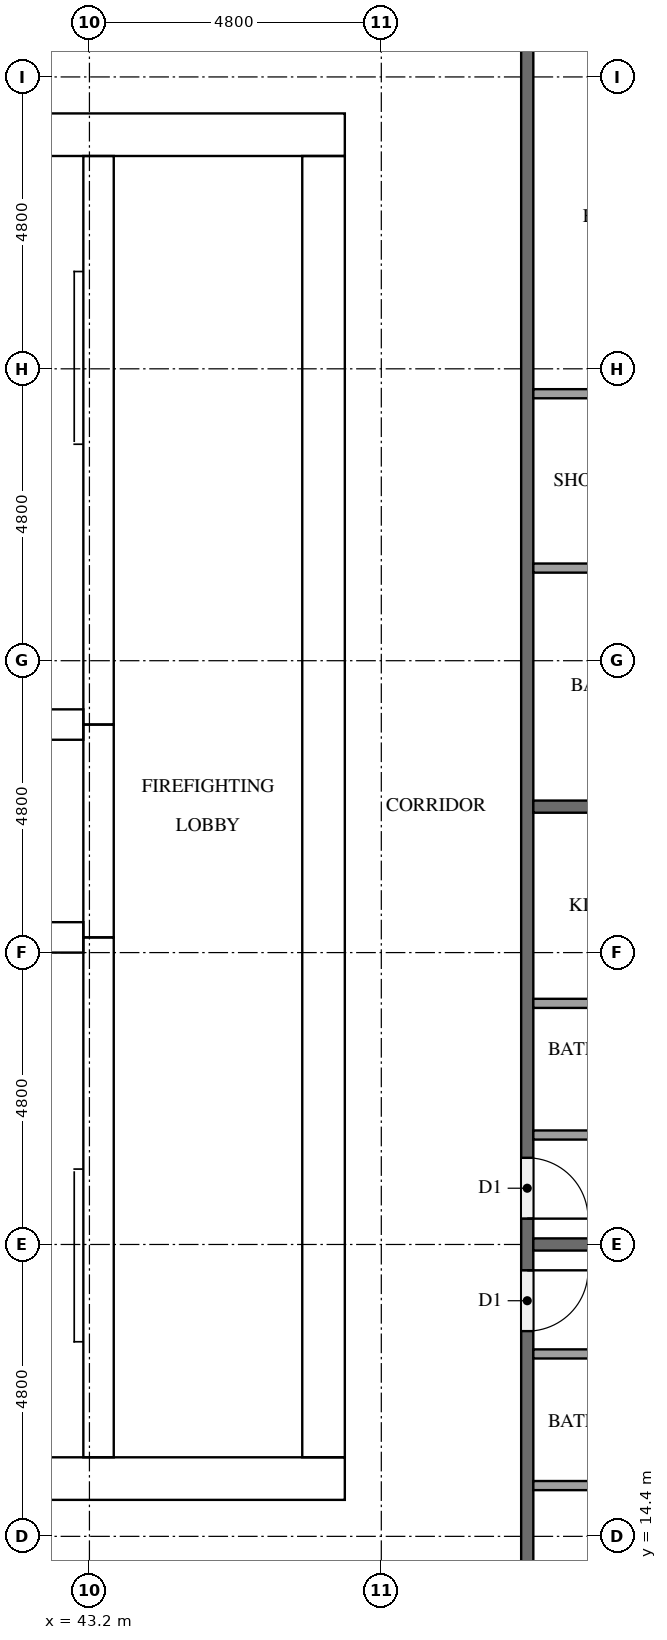
"""IFC4 building model, lengths in metres.
Left out: names, types, materials, properties, quantities, classifications, styles, units other than length and angle.
Written with IfcOpenShell. Run it as: python <this file> out.ifc"""

import sys

from ifc_helpers import new_model, si_unit, direction, frame, frame_2d, origin, place, context, subcontext, project, spatial, rectangle, extrude, element, fill, save


model = new_model("IFC4")
c1 = context("Model", 3, precision=1e-05, world=origin(), true_north=direction((0.0, 1.0)))
c2 = subcontext(c1, "Body", "Model", "MODEL_VIEW")
j1 = project(units=[si_unit("LENGTHUNIT", "METRE"), si_unit("PLANEANGLEUNIT", "RADIAN")], contexts=[c1])
p1 = place(None, origin())
s1 = spatial("IfcSite", under=j1, at=p1, CompositionType="ELEMENT")
p2 = place(p1, origin())
s2 = spatial("IfcBuilding", under=s1, at=p2, CompositionType="ELEMENT")
p3 = place(p2, frame((0.0, 0.0, 196.4)))
s3 = spatial("IfcBuildingStorey", under=s2, at=p3, CompositionType="ELEMENT", Elevation=196.4)
p4 = place(p3, frame((15.0, 15.35, 0.0), z_axis=(0.0, 0.0, 1.0), x_axis=(1.0, 0.0, 0.0)))
e1 = element("IfcWall", 1, at=p4, inside=s3, PredefinedType="SHEAR", context=c2, shape_type="SweptSolid", body=[
    extrude(rectangle(XDim=32.4, YDim=0.7, at=frame_2d((16.2, 0.0))), origin(), (0.0, 0.0, 1.0), 3.2),
])
p5 = place(p4, frame((15.3, 0.0, 0.0)))
e2 = element("IfcOpeningElement", 2, at=p5, cuts=e1, PredefinedType="OPENING", context=c2, shape_type="SweptSolid", body=[
    extrude(rectangle(XDim=1.8, YDim=2.1, at=frame_2d((0.9, 1.05))), frame((0.0, 0.36, 0.0), z_axis=(0.0, -1.0, 0.0), x_axis=(1.0, 0.0, 0.0)), (0.0, 0.0, 1.0), 0.72),
])
p6 = place(p3, frame((15.0, 37.45, 0.0), z_axis=(0.0, 0.0, 1.0), x_axis=(1.0, 0.0, 0.0)))
e3 = element("IfcWall", 3, at=p6, inside=s3, PredefinedType="SHEAR", context=c2, shape_type="SweptSolid", body=[
    extrude(rectangle(XDim=32.4, YDim=0.7, at=frame_2d((16.2, 0.0))), origin(), (0.0, 0.0, 1.0), 3.2),
])
p7 = place(p6, frame((15.3, 0.0, 0.0)))
e4 = element("IfcOpeningElement", 4, at=p7, cuts=e3, PredefinedType="OPENING", context=c2, shape_type="SweptSolid", body=[
    extrude(rectangle(XDim=1.8, YDim=2.1, at=frame_2d((0.9, 1.05))), frame((0.0, 0.36, 0.0), z_axis=(0.0, -1.0, 0.0), x_axis=(1.0, 0.0, 0.0)), (0.0, 0.0, 1.0), 0.72),
])
p8 = place(p6, frame((1.544, 0.0, 0.0)))
e5 = element("IfcOpeningElement", 5, at=p8, cuts=e3, PredefinedType="OPENING", context=c2, shape_type="SweptSolid", body=[
    extrude(rectangle(XDim=1.0, YDim=2.1, at=frame_2d((0.5, 1.05))), frame((0.0, 0.36, 0.0), z_axis=(0.0, -1.0, 0.0), x_axis=(1.0, 0.0, 0.0)), (0.0, 0.0, 1.0), 0.72),
])
p9 = place(p6, frame((5.219, 0.0, 0.0)))
e6 = element("IfcOpeningElement", 6, at=p9, cuts=e3, PredefinedType="OPENING", context=c2, shape_type="SweptSolid", body=[
    extrude(rectangle(XDim=1.0, YDim=2.1, at=frame_2d((0.5, 1.05))), frame((0.0, 0.36, 0.0), z_axis=(0.0, -1.0, 0.0), x_axis=(1.0, 0.0, 0.0)), (0.0, 0.0, 1.0), 0.72),
])
p10 = place(p3, frame((47.05, 15.7, 0.0), z_axis=(0.0, 0.0, 1.0), x_axis=(0.0, 1.0, 0.0)))
e7 = element("IfcWall", 7, at=p10, inside=s3, PredefinedType="SHEAR", context=c2, shape_type="SweptSolid", body=[
    extrude(rectangle(XDim=21.4, YDim=0.7, at=frame_2d((10.7, 0.0))), origin(), (0.0, 0.0, 1.0), 3.2),
])
p11 = place(p10, frame((10.4, 0.0, 0.0)))
e8 = element("IfcOpeningElement", 8, at=p11, cuts=e7, PredefinedType="OPENING", context=c2, shape_type="SweptSolid", body=[
    extrude(rectangle(XDim=1.2, YDim=2.1, at=frame_2d((0.6, 1.05))), frame((0.0, 0.36, 0.0), z_axis=(0.0, -1.0, 0.0), x_axis=(1.0, 0.0, 0.0)), (0.0, 0.0, 1.0), 0.72),
])
p12 = place(p3, frame((43.35, 15.7, 0.0), z_axis=(0.0, 0.0, 1.0), x_axis=(0.0, 1.0, 0.0)))
e9 = element("IfcWall", 9, at=p12, inside=s3, PredefinedType="SHEAR", context=c2, shape_type="SweptSolid", body=[
    extrude(rectangle(XDim=8.55, YDim=0.5, at=frame_2d((4.275, 0.0))), origin(), (0.0, 0.0, 1.0), 3.2),
])
p13 = place(p12, frame((0.5, 0.0, 0.0)))
e10 = element("IfcOpeningElement", 10, at=p13, cuts=e9, PredefinedType="OPENING", context=c2, shape_type="SweptSolid", body=[
    extrude(rectangle(XDim=1.2, YDim=2.1, at=frame_2d((0.6, 1.05))), frame((0.0, 0.26, 0.0), z_axis=(0.0, -1.0, 0.0), x_axis=(1.0, 0.0, 0.0)), (0.0, 0.0, 1.0), 0.52),
])
p14 = place(p3, frame((43.35, 24.25, 0.0), z_axis=(0.0, 0.0, 1.0), x_axis=(0.0, 1.0, 0.0)))
e11 = element("IfcWall", 11, at=p14, inside=s3, PredefinedType="SHEAR", context=c2, shape_type="SweptSolid", body=[
    extrude(rectangle(XDim=3.5, YDim=0.5, at=frame_2d((1.75, 0.0))), origin(), (0.0, 0.0, 1.0), 3.2),
])
p15 = place(p14, frame((1.2, 0.0, 0.0)))
e12 = element("IfcOpeningElement", 12, at=p15, cuts=e11, PredefinedType="OPENING", context=c2, shape_type="SweptSolid", body=[
    extrude(rectangle(XDim=1.1, YDim=2.1, at=frame_2d((0.55, 1.05))), frame((0.0, 0.26, 0.0), z_axis=(0.0, -1.0, 0.0), x_axis=(1.0, 0.0, 0.0)), (0.0, 0.0, 1.0), 0.52),
])
p16 = place(p3, frame((43.35, 27.75, 0.0), z_axis=(0.0, 0.0, 1.0), x_axis=(0.0, 1.0, 0.0)))
e13 = element("IfcWall", 13, at=p16, inside=s3, PredefinedType="SHEAR", context=c2, shape_type="SweptSolid", body=[
    extrude(rectangle(XDim=9.35, YDim=0.5, at=frame_2d((4.675, 0.0))), origin(), (0.0, 0.0, 1.0), 3.2),
])
p17 = place(p16, frame((7.65, 0.0, 0.0)))
e14 = element("IfcOpeningElement", 14, at=p17, cuts=e13, PredefinedType="OPENING", context=c2, shape_type="SweptSolid", body=[
    extrude(rectangle(XDim=1.2, YDim=2.1, at=frame_2d((0.6, 1.05))), frame((0.0, 0.26, 0.0), z_axis=(0.0, -1.0, 0.0), x_axis=(1.0, 0.0, 0.0)), (0.0, 0.0, 1.0), 0.52),
])
for number, where, z_axis, x_axis in (
    (15, (39.55, 24.25, 0.0), (0.0, 0.0, 1.0), (1.0, 0.0, 0.0)),
    (16, (39.55, 27.75, 0.0), (0.0, 0.0, 1.0), (1.0, 0.0, 0.0)),
):
    element("IfcWall", number, at=place(p3, frame(where, z_axis=z_axis, x_axis=x_axis)), inside=s3, PredefinedType="SHEAR", context=c2, shape_type="SweptSolid", body=[
        extrude(rectangle(XDim=3.55, YDim=0.5, at=frame_2d((1.775, 0.0))), origin(), (0.0, 0.0, 1.0), 3.2),
    ])
p18 = place(p3, frame((50.4, 40.7, 0.0), z_axis=(0.0, 0.0, 1.0), x_axis=(0.0, -1.0, 0.0)))
e17 = element("IfcWall", 17, at=p18, inside=s3, PredefinedType="PARTITIONING", context=c2, shape_type="SweptSolid", body=[
    extrude(rectangle(XDim=28.6, YDim=0.2, at=frame_2d((14.3, 0.0))), origin(), (0.0, 0.0, 1.0), 3.2),
])
p19 = place(p18, frame((21.925, 0.0, 0.0)))
e18 = element("IfcOpeningElement", 18, at=p19, cuts=e17, PredefinedType="OPENING", context=c2, shape_type="SweptSolid", body=[
    extrude(rectangle(XDim=1.0, YDim=2.1, at=frame_2d((0.5, 1.05))), frame((0.0, 0.11, 0.0), z_axis=(0.0, -1.0, 0.0), x_axis=(1.0, 0.0, 0.0)), (0.0, 0.0, 1.0), 0.22),
])
p20 = place(p18, frame((20.075, 0.0, 0.0)))
e19 = element("IfcOpeningElement", 19, at=p20, cuts=e17, PredefinedType="OPENING", context=c2, shape_type="SweptSolid", body=[
    extrude(rectangle(XDim=1.0, YDim=2.1, at=frame_2d((0.5, 1.05))), frame((0.0, 0.11, 0.0), z_axis=(0.0, -1.0, 0.0), x_axis=(1.0, 0.0, 0.0)), (0.0, 0.0, 1.0), 0.22),
])
p21 = place(p18, frame((0.325, 0.0, 0.0)))
e20 = element("IfcOpeningElement", 20, at=p21, cuts=e17, PredefinedType="OPENING", context=c2, shape_type="SweptSolid", body=[
    extrude(rectangle(XDim=1.0, YDim=2.1, at=frame_2d((0.5, 1.05))), frame((0.0, 0.11, 0.0), z_axis=(0.0, -1.0, 0.0), x_axis=(1.0, 0.0, 0.0)), (0.0, 0.0, 1.0), 0.22),
])
for number, where, z_axis, x_axis in (
    (21, (50.5, 19.2, 0.0), (0.0, 0.0, 1.0), (1.0, 0.0, 0.0)),
    (22, (50.5, 26.4, 0.0), (0.0, 0.0, 1.0), (1.0, 0.0, 0.0)),
):
    element("IfcWall", number, at=place(p3, frame(where, z_axis=z_axis, x_axis=x_axis)), inside=s3, PredefinedType="PARTITIONING", context=c2, shape_type="SweptSolid", body=[
        extrude(rectangle(XDim=11.8, YDim=0.2, at=frame_2d((5.9, 0.0))), origin(), (0.0, 0.0, 1.0), 3.2),
    ])
p22 = place(p3, frame((50.5, 15.235, 0.0), z_axis=(0.0, 0.0, 1.0), x_axis=(1.0, 0.0, 0.0)))
e23 = element("IfcWall", 23, at=p22, inside=s3, PredefinedType="PARTITIONING", context=c2, shape_type="SweptSolid", body=[
    extrude(rectangle(XDim=3.875, YDim=0.15, at=frame_2d((1.938, 0.0))), origin(), (0.0, 0.0, 1.0), 3.2),
])
p23 = place(p3, frame((50.5, 17.4, 0.0), z_axis=(0.0, 0.0, 1.0), x_axis=(1.0, 0.0, 0.0)))
e24 = element("IfcWall", 24, at=p23, inside=s3, PredefinedType="PARTITIONING", context=c2, shape_type="SweptSolid", body=[
    extrude(rectangle(XDim=4.025, YDim=0.15, at=frame_2d((2.012, 0.0))), origin(), (0.0, 0.0, 1.0), 3.2),
])
p24 = place(p3, frame((50.5, 23.165, 0.0), z_axis=(0.0, 0.0, 1.0), x_axis=(1.0, 0.0, 0.0)))
e25 = element("IfcWall", 25, at=p24, inside=s3, PredefinedType="PARTITIONING", context=c2, shape_type="SweptSolid", body=[
    extrude(rectangle(XDim=3.275, YDim=0.15, at=frame_2d((1.637, 0.0))), origin(), (0.0, 0.0, 1.0), 3.2),
])
p25 = place(p3, frame((50.5, 21.0, 0.0), z_axis=(0.0, 0.0, 1.0), x_axis=(1.0, 0.0, 0.0)))
e26 = element("IfcWall", 26, at=p25, inside=s3, PredefinedType="PARTITIONING", context=c2, shape_type="SweptSolid", body=[
    extrude(rectangle(XDim=3.425, YDim=0.15, at=frame_2d((1.712, 0.0))), origin(), (0.0, 0.0, 1.0), 3.2),
])
for number, where, z_axis, x_axis in (
    (27, (50.5, 33.19, 0.0), (0.0, 0.0, 1.0), (1.0, 0.0, 0.0)),
    (28, (50.5, 30.323, 0.0), (0.0, 0.0, 1.0), (1.0, 0.0, 0.0)),
):
    element("IfcWall", number, at=place(p3, frame(where, z_axis=z_axis, x_axis=x_axis)), inside=s3, PredefinedType="PARTITIONING", context=c2, shape_type="SweptSolid", body=[
        extrude(rectangle(XDim=3.725, YDim=0.15, at=frame_2d((1.863, 0.0))), origin(), (0.0, 0.0, 1.0), 3.2),
    ])
p26 = place(p15, origin())
e29 = element("IfcDoor", 29, at=p26, inside=s3, OperationType="DOUBLE_DOOR_SLIDING", PredefinedType="DOOR", context=c2, shape_type="SweptSolid", body=[
    extrude(rectangle(XDim=1.1, YDim=2.1, at=frame_2d((0.55, 1.05))), frame((0.0, 0.025, 0.0), z_axis=(0.0, -1.0, 0.0), x_axis=(1.0, 0.0, 0.0)), (0.0, 0.0, 1.0), 0.05),
])
fill(e12, e29)
p27 = place(p13, origin())
e30 = element("IfcDoor", 30, at=p27, inside=s3, OperationType="SINGLE_SWING_RIGHT", PredefinedType="DOOR", context=c2, shape_type="SweptSolid", body=[
    extrude(rectangle(XDim=1.2, YDim=2.1, at=frame_2d((0.6, 1.05))), frame((0.0, 0.025, 0.0), z_axis=(0.0, -1.0, 0.0), x_axis=(1.0, 0.0, 0.0)), (0.0, 0.0, 1.0), 0.05),
])
fill(e10, e30)
p28 = place(p17, origin())
e31 = element("IfcDoor", 31, at=p28, inside=s3, OperationType="SINGLE_SWING_LEFT", PredefinedType="DOOR", context=c2, shape_type="SweptSolid", body=[
    extrude(rectangle(XDim=1.2, YDim=2.1, at=frame_2d((0.6, 1.05))), frame((0.0, 0.025, 0.0), z_axis=(0.0, -1.0, 0.0), x_axis=(1.0, 0.0, 0.0)), (0.0, 0.0, 1.0), 0.05),
])
fill(e14, e31)
p29 = place(p11, origin())
e32 = element("IfcDoor", 32, at=p29, inside=s3, OperationType="SINGLE_SWING_LEFT", PredefinedType="DOOR", context=c2, shape_type="SweptSolid", body=[
    extrude(rectangle(XDim=1.2, YDim=2.1, at=frame_2d((0.6, 1.05))), frame((0.0, 0.025, 0.0), z_axis=(0.0, -1.0, 0.0), x_axis=(1.0, 0.0, 0.0)), (0.0, 0.0, 1.0), 0.05),
])
fill(e8, e32)
p30 = place(p19, origin())
e33 = element("IfcDoor", 33, at=p30, inside=s3, OperationType="SINGLE_SWING_LEFT", PredefinedType="DOOR", context=c2, shape_type="SweptSolid", body=[
    extrude(rectangle(XDim=1.0, YDim=2.1, at=frame_2d((0.5, 1.05))), frame((0.0, 0.025, 0.0), z_axis=(0.0, -1.0, 0.0), x_axis=(1.0, 0.0, 0.0)), (0.0, 0.0, 1.0), 0.05),
])
fill(e18, e33)
p31 = place(p20, origin())
e34 = element("IfcDoor", 34, at=p31, inside=s3, OperationType="SINGLE_SWING_RIGHT", PredefinedType="DOOR", context=c2, shape_type="SweptSolid", body=[
    extrude(rectangle(XDim=1.0, YDim=2.1, at=frame_2d((0.5, 1.05))), frame((0.0, 0.025, 0.0), z_axis=(0.0, -1.0, 0.0), x_axis=(1.0, 0.0, 0.0)), (0.0, 0.0, 1.0), 0.05),
])
fill(e19, e34)
save(model, sys.argv[1])
